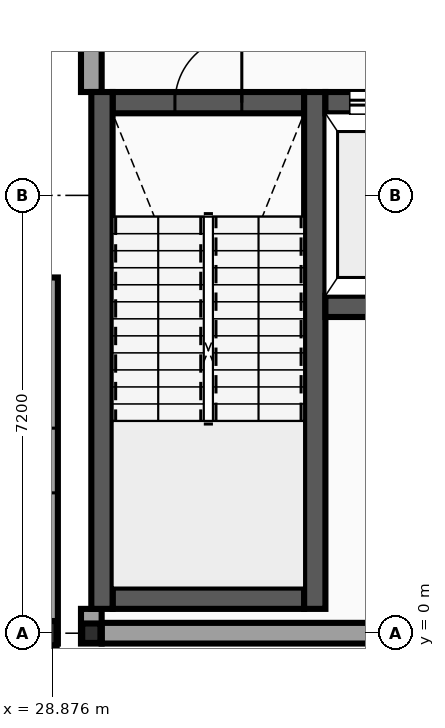
"""IFC4 building model, lengths in metres.
Left out: names, types, materials, properties, quantities, classifications, styles, units other than length and angle.
Written with IfcOpenShell. Run it as: python <this file> out.ifc"""

import sys

from ifc_helpers import new_model, si_unit, direction, frame, frame_2d, origin, origin_2d, place, context, subcontext, project, spatial, rectangle, i_section, extrude, element, fill, save


model = new_model("IFC4")
c1 = context("Model", 3, precision=1e-05, world=origin(), true_north=direction((0.0, 1.0)))
c2 = subcontext(c1, "Body", "Model", "MODEL_VIEW")
j1 = project(units=[si_unit("LENGTHUNIT", "METRE"), si_unit("PLANEANGLEUNIT", "RADIAN")], contexts=[c1])
p1 = place(None, origin())
s1 = spatial("IfcSite", under=j1, at=p1, CompositionType="ELEMENT")
p2 = place(p1, origin())
s2 = spatial("IfcBuilding", under=s1, at=p2, CompositionType="ELEMENT")
p3 = place(p2, frame((0.0, 0.0, 14.0)))
s3 = spatial("IfcBuildingStorey", under=s2, at=p3, CompositionType="ELEMENT", Elevation=14.0)
p4 = place(p3, frame((28.8, 0.0, 0.0), z_axis=(0.0, 0.0, 1.0), x_axis=(1.0, 0.0, 0.0)))
e1 = element("IfcColumn", 1, at=p4, inside=s3, PredefinedType="COLUMN", context=c2, shape_type="SweptSolid", body=[
    extrude(i_section(OverallWidth=0.3, OverallDepth=0.4, WebThickness=0.013, FlangeThickness=0.024, FilletRadius=0.027, at=origin_2d()), origin(), (0.0, 0.0, 1.0), 4.4),
])
p5 = place(p3, frame((29.52, 0.0, 0.0), z_axis=(0.0, 0.0, 1.0), x_axis=(1.0, 0.0, 0.0)))
e2 = element("IfcColumn", 2, at=p5, inside=s3, PredefinedType="COLUMN", context=c2, shape_type="SweptSolid", body=[
    extrude(i_section(OverallWidth=0.3, OverallDepth=0.32, WebThickness=0.011, FlangeThickness=0.021, FilletRadius=0.027, at=origin_2d()), origin(), (0.0, 0.0, 1.0), 4.4),
])
p6 = place(p3, frame((28.8, -0.17, 0.0), z_axis=(0.0, 0.0, 1.0), x_axis=(0.0, 1.0, 0.0)))
e3 = element("IfcWall", 3, at=p6, inside=s3, PredefinedType="STANDARD", context=c2, shape_type="SweptSolid", body=[
    extrude(rectangle(XDim=6.02, YDim=0.34, at=frame_2d((3.01, 0.0))), origin(), (0.0, 0.0, 1.0), 4.2),
])
p7 = place(p6, frame((2.478, 0.0, 0.95)))
e4 = element("IfcOpeningElement", 4, at=p7, cuts=e3, PredefinedType="OPENING", context=c2, shape_type="SweptSolid", body=[
    extrude(rectangle(XDim=1.064, YDim=1.368, at=frame_2d((0.532, 0.684))), frame((0.0, 0.18, 0.0), z_axis=(0.0, -1.0, 0.0), x_axis=(1.0, 0.0, 0.0)), (0.0, 0.0, 1.0), 0.36),
])
p8 = place(p3, frame((29.69, 0.0, 0.0), z_axis=(0.0, 0.0, 1.0), x_axis=(1.0, 0.0, 0.0)))
e5 = element("IfcWall", 5, at=p8, inside=s3, PredefinedType="STANDARD", context=c2, shape_type="SweptSolid", body=[
    extrude(rectangle(XDim=6.42, YDim=0.34, at=frame_2d((3.21, 0.0))), origin(), (0.0, 0.0, 1.0), 3.935),
])
p9 = place(p3, frame((29.52, 0.4, 0.0), z_axis=(0.0, 0.0, 1.0), x_axis=(0.0, -1.0, 0.0)))
e6 = element("IfcWall", 6, at=p9, inside=s3, PredefinedType="STANDARD", context=c2, shape_type="SweptSolid", body=[
    extrude(rectangle(XDim=0.57, YDim=0.34, at=frame_2d((0.285, 0.0))), origin(), (0.0, 0.0, 1.0), 4.2),
])
p10 = place(p3, frame((29.52, 14.4, 0.0), z_axis=(0.0, 0.0, 1.0), x_axis=(0.0, -1.0, 0.0)))
e7 = element("IfcWall", 7, at=p10, inside=s3, PredefinedType="STANDARD", context=c2, shape_type="SweptSolid", body=[
    extrude(rectangle(XDim=5.5, YDim=0.34, at=frame_2d((2.75, 0.0))), origin(), (0.0, 0.0, 1.0), 4.2),
])
p11 = place(p3, frame((29.87, 0.575, 0.0), z_axis=(0.0, 0.0, 1.0), x_axis=(1.0, 0.0, 0.0)))
e8 = element("IfcWall", 8, at=p11, inside=s3, PredefinedType="SHEAR", context=c2, shape_type="SweptSolid", body=[
    extrude(rectangle(XDim=3.15, YDim=0.35, at=frame_2d((1.575, 0.0))), origin(), (0.0, 0.0, 1.0), 4.2),
])
p12 = place(p3, frame((29.87, 8.725, 0.0), z_axis=(0.0, 0.0, 1.0), x_axis=(1.0, 0.0, 0.0)))
e9 = element("IfcWall", 9, at=p12, inside=s3, PredefinedType="SHEAR", context=c2, shape_type="SweptSolid", body=[
    extrude(rectangle(XDim=3.15, YDim=0.35, at=frame_2d((1.575, 0.0))), origin(), (0.0, 0.0, 1.0), 4.2),
])
p13 = place(p12, frame((1.025, 0.0, 0.0)))
e10 = element("IfcOpeningElement", 10, at=p13, cuts=e9, PredefinedType="OPENING", context=c2, shape_type="SweptSolid", body=[
    extrude(rectangle(XDim=1.1, YDim=2.15, at=frame_2d((0.55, 1.075))), frame((0.0, 0.185, 0.0), z_axis=(0.0, -1.0, 0.0), x_axis=(1.0, 0.0, 0.0)), (0.0, 0.0, 1.0), 0.37),
])
for number, where, z_axis, x_axis in (
    (11, (29.695, 0.4, 0.0), (0.0, 0.0, 1.0), (0.0, 1.0, 0.0)),
    (12, (33.195, 0.4, 0.0), (0.0, 0.0, 1.0), (0.0, 1.0, 0.0)),
):
    element("IfcWall", number, at=place(p3, frame(where, z_axis=z_axis, x_axis=x_axis)), inside=s3, PredefinedType="SHEAR", context=c2, shape_type="SweptSolid", body=[
        extrude(rectangle(XDim=8.5, YDim=0.35, at=frame_2d((4.25, 0.0))), origin(), (0.0, 0.0, 1.0), 4.2),
    ])
p14 = place(p3, frame((33.37, 5.375, 0.0), z_axis=(0.0, 0.0, 1.0), x_axis=(1.0, 0.0, 0.0)))
e13 = element("IfcWall", 13, at=p14, inside=s3, PredefinedType="SHEAR", context=c2, shape_type="SweptSolid", body=[
    extrude(rectangle(XDim=2.0, YDim=0.35, at=frame_2d((1.0, 0.0))), origin(), (0.0, 0.0, 1.0), 4.2),
])
p15 = place(p3, frame((33.37, 8.725, 0.0), z_axis=(0.0, 0.0, 1.0), x_axis=(1.0, 0.0, 0.0)))
e14 = element("IfcWall", 14, at=p15, inside=s3, PredefinedType="SHEAR", context=c2, shape_type="SweptSolid", body=[
    extrude(rectangle(XDim=2.0, YDim=0.35, at=frame_2d((1.0, 0.0))), origin(), (0.0, 0.0, 1.0), 4.2),
])
p16 = place(p15, frame((0.4, 0.0, 0.0)))
e15 = element("IfcOpeningElement", 15, at=p16, cuts=e14, PredefinedType="OPENING", context=c2, shape_type="SweptSolid", body=[
    extrude(rectangle(XDim=1.2, YDim=2.2, at=frame_2d((0.6, 1.1))), frame((0.0, 0.185, 0.0), z_axis=(0.0, -1.0, 0.0), x_axis=(1.0, 0.0, 0.0)), (0.0, 0.0, 1.0), 0.37),
])
p17 = place(p13, frame((1.1, 0.0, 0.0), z_axis=(0.0, 0.0, 1.0), x_axis=(-1.0, 0.0, 0.0)))
e16 = element("IfcDoor", 16, at=p17, inside=s3, OperationType="SINGLE_SWING_RIGHT", PredefinedType="DOOR", context=c2, shape_type="SweptSolid", body=[
    extrude(rectangle(XDim=1.1, YDim=2.15, at=frame_2d((0.55, 1.075))), frame((0.0, 0.025, 0.0), z_axis=(0.0, -1.0, 0.0), x_axis=(1.0, 0.0, 0.0)), (0.0, 0.0, 1.0), 0.05),
])
fill(e10, e16)
p18 = place(p16, origin())
e17 = element("IfcDoor", 17, at=p18, inside=s3, OperationType="SLIDING_TO_RIGHT", PredefinedType="DOOR", context=c2, shape_type="SweptSolid", body=[
    extrude(rectangle(XDim=1.2, YDim=2.2, at=frame_2d((0.6, 1.1))), frame((0.0, 0.025, 0.0), z_axis=(0.0, -1.0, 0.0), x_axis=(1.0, 0.0, 0.0)), (0.0, 0.0, 1.0), 0.05),
])
fill(e15, e17)
save(model, sys.argv[1])
